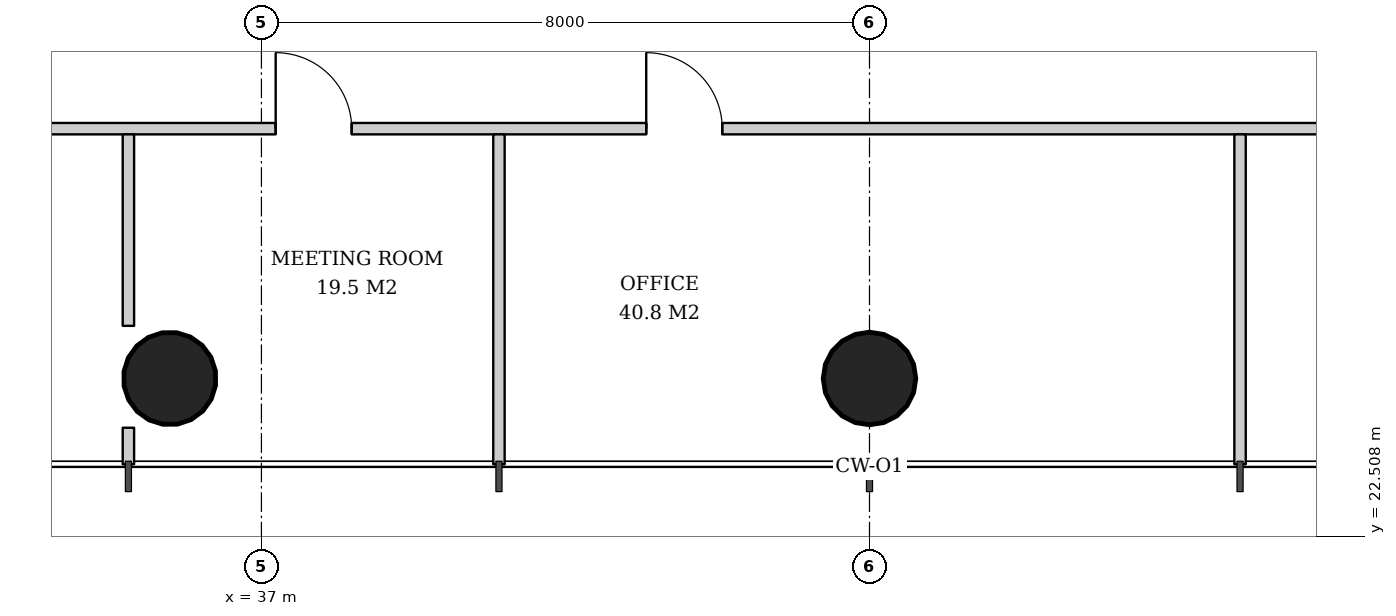
"""IFC4 building model, lengths in metres.
Left out: names, types, materials, properties, quantities, classifications, styles, units other than length and angle.
Written with IfcOpenShell. Run it as: python <this file> out.ifc"""

import sys

from ifc_helpers import new_model, si_unit, direction, frame, frame_2d, origin, origin_2d, place, context, subcontext, project, spatial, rectangle, hollow_circle, extrude, element, fill, save


model = new_model("IFC4")
c1 = context("Model", 3, precision=1e-05, world=origin(), true_north=direction((0.0, 1.0)))
c2 = subcontext(c1, "Body", "Model", "MODEL_VIEW")
j1 = project(units=[si_unit("LENGTHUNIT", "METRE"), si_unit("PLANEANGLEUNIT", "RADIAN")], contexts=[c1])
p1 = place(None, origin())
s1 = spatial("IfcSite", under=j1, at=p1, CompositionType="ELEMENT")
p2 = place(p1, origin())
s2 = spatial("IfcBuilding", under=s1, at=p2, CompositionType="ELEMENT")
p3 = place(p2, frame((0.0, 0.0, 100.8)))
s3 = spatial("IfcBuildingStorey", under=s2, at=p3, CompositionType="ELEMENT", Elevation=100.8)
p4 = place(p3, frame((35.775, 24.55, 0.0), z_axis=(0.015987237665, 0.031910269556, 0.999362868496), x_axis=(-0.894067115991, 0.447933021895, 0.0)))
e1 = element("IfcColumn", 1, at=p4, inside=s3, PredefinedType="COLUMN", context=c2, shape_type="SweptSolid", body=[
    extrude(hollow_circle(Radius=0.61, WallThickness=0.04, at=origin_2d()), origin(), (0.0, 0.0, 1.0), 3.802),
])
p5 = place(p3, frame((45.0, 24.55, 0.0), z_axis=(0.0, 0.031914348339, 0.999490607445), x_axis=(-1.0, 0.0, 0.0)))
e2 = element("IfcColumn", 2, at=p5, inside=s3, PredefinedType="COLUMN", context=c2, shape_type="SweptSolid", body=[
    extrude(hollow_circle(Radius=0.61, WallThickness=0.04, at=origin_2d()), origin(), (0.0, 0.0, 1.0), 3.802),
])
p6 = place(p3, frame((28.789, 27.875, 0.0), z_axis=(0.0, 0.0, 1.0), x_axis=(1.0, 0.0, 0.0)))
e3 = element("IfcWall", 3, at=p6, inside=s3, PredefinedType="PARTITIONING", context=c2, shape_type="SweptSolid", body=[
    extrude(rectangle(XDim=32.423, YDim=0.15, at=frame_2d((16.211, 0.0))), origin(), (0.0, 0.0, 1.0), 2.72),
])
p7 = place(p6, frame((3.524, 0.0, 0.0)))
e4 = element("IfcOpeningElement", 4, at=p7, cuts=e3, PredefinedType="OPENING", context=c2, shape_type="SweptSolid", body=[
    extrude(rectangle(XDim=1.0, YDim=2.1, at=frame_2d((0.5, 1.05))), frame((0.0, 0.085, 0.0), z_axis=(0.0, -1.0, 0.0), x_axis=(1.0, 0.0, 0.0)), (0.0, 0.0, 1.0), 0.17),
])
p8 = place(p6, frame((8.399, 0.0, 0.0)))
e5 = element("IfcOpeningElement", 5, at=p8, cuts=e3, PredefinedType="OPENING", context=c2, shape_type="SweptSolid", body=[
    extrude(rectangle(XDim=1.0, YDim=2.1, at=frame_2d((0.5, 1.05))), frame((0.0, 0.085, 0.0), z_axis=(0.0, -1.0, 0.0), x_axis=(1.0, 0.0, 0.0)), (0.0, 0.0, 1.0), 0.17),
])
p9 = place(p6, frame((13.274, 0.0, 0.0)))
e6 = element("IfcOpeningElement", 6, at=p9, cuts=e3, PredefinedType="OPENING", context=c2, shape_type="SweptSolid", body=[
    extrude(rectangle(XDim=1.0, YDim=2.1, at=frame_2d((0.5, 1.05))), frame((0.0, 0.085, 0.0), z_axis=(0.0, -1.0, 0.0), x_axis=(1.0, 0.0, 0.0)), (0.0, 0.0, 1.0), 0.17),
])
p10 = place(p6, frame((23.024, 0.0, 0.0)))
e7 = element("IfcOpeningElement", 7, at=p10, cuts=e3, PredefinedType="OPENING", context=c2, shape_type="SweptSolid", body=[
    extrude(rectangle(XDim=1.0, YDim=2.1, at=frame_2d((0.5, 1.05))), frame((0.0, 0.085, 0.0), z_axis=(0.0, -1.0, 0.0), x_axis=(1.0, 0.0, 0.0)), (0.0, 0.0, 1.0), 0.17),
])
p11 = place(p3, frame((35.25, 27.8, 0.0), z_axis=(0.0, 0.0, 1.0), x_axis=(0.0, -1.0, 0.0)))
e8 = element("IfcWall", 8, at=p11, inside=s3, PredefinedType="PARTITIONING", context=c2, shape_type="SweptSolid", body=[
    extrude(rectangle(XDim=2.519, YDim=0.15, at=frame_2d((1.26, 0.0))), origin(), (0.0, 0.0, 1.0), 3.62),
])
p12 = place(p3, frame((35.25, 23.94, 0.0), z_axis=(0.0, 0.0, 1.0), x_axis=(0.0, -1.0, 0.0)))
e9 = element("IfcWall", 9, at=p12, inside=s3, PredefinedType="PARTITIONING", context=c2, shape_type="SweptSolid", body=[
    extrude(rectangle(XDim=0.48, YDim=0.15, at=frame_2d((0.24, 0.0))), origin(), (0.0, 0.0, 1.0), 3.62),
])
for number, where, z_axis, x_axis in (
    (10, (40.125, 27.8, 0.0), (0.0, 0.0, 1.0), (0.0, -1.0, 0.0)),
    (11, (49.875, 27.8, 0.0), (0.0, 0.0, 1.0), (0.0, -1.0, 0.0)),
):
    element("IfcWall", number, at=place(p3, frame(where, z_axis=z_axis, x_axis=x_axis)), inside=s3, PredefinedType="PARTITIONING", context=c2, shape_type="SweptSolid", body=[
        extrude(rectangle(XDim=4.34, YDim=0.15, at=frame_2d((2.17, 0.0))), origin(), (0.0, 0.0, 1.0), 2.82),
    ])
p13 = place(p8, origin())
e12 = element("IfcDoor", 12, at=p13, inside=s3, OperationType="SINGLE_SWING_LEFT", PredefinedType="DOOR", context=c2, shape_type="SweptSolid", body=[
    extrude(rectangle(XDim=1.0, YDim=2.1, at=frame_2d((0.5, 1.05))), frame((0.0, 0.025, 0.0), z_axis=(0.0, -1.0, 0.0), x_axis=(1.0, 0.0, 0.0)), (0.0, 0.0, 1.0), 0.05),
])
fill(e5, e12)
p14 = place(p9, origin())
e13 = element("IfcDoor", 13, at=p14, inside=s3, OperationType="SINGLE_SWING_LEFT", PredefinedType="DOOR", context=c2, shape_type="SweptSolid", body=[
    extrude(rectangle(XDim=1.0, YDim=2.1, at=frame_2d((0.5, 1.05))), frame((0.0, 0.025, 0.0), z_axis=(0.0, -1.0, 0.0), x_axis=(1.0, 0.0, 0.0)), (0.0, 0.0, 1.0), 0.05),
])
fill(e6, e13)
save(model, sys.argv[1])
